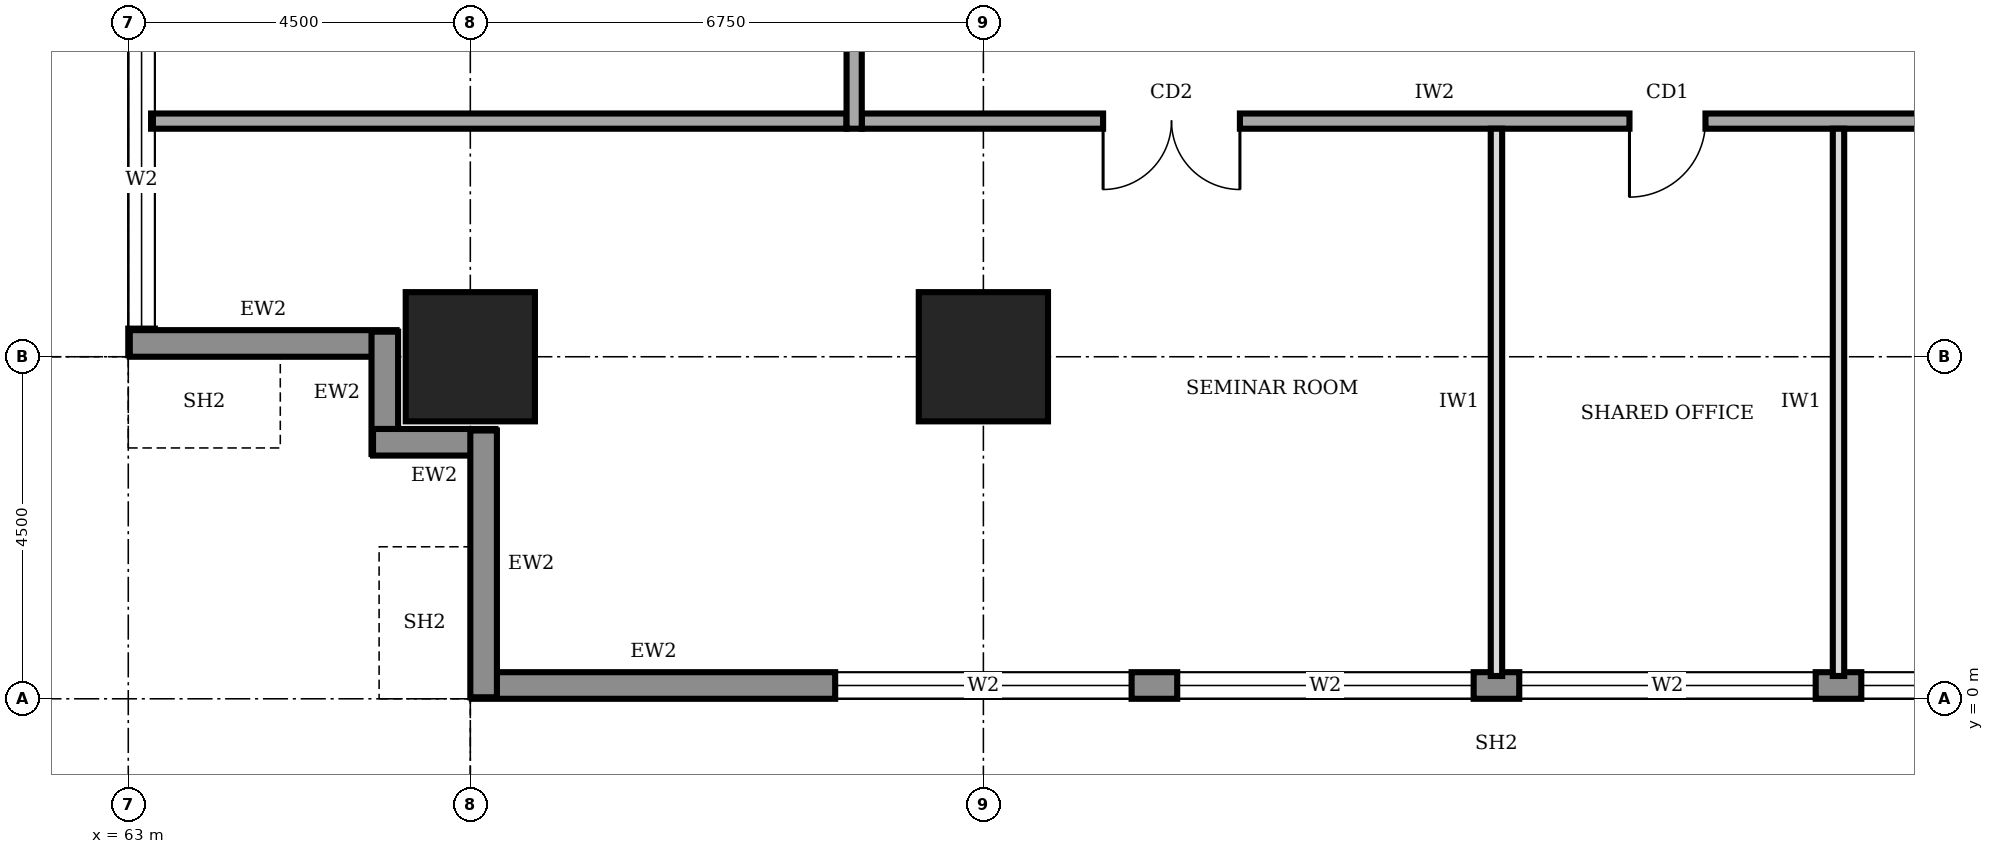
"""IFC4 building model, lengths in metres.
Left out: names, types, materials, properties, quantities, classifications, styles, units other than length and angle.
Written with IfcOpenShell. Run it as: python <this file> out.ifc"""

import sys

from ifc_helpers import new_model, si_unit, direction, frame, frame_2d, origin, origin_2d, place, context, subcontext, project, spatial, rectangle, extrude, element, fill, save


model = new_model("IFC4")
c1 = context("Model", 3, precision=1e-05, world=origin(), true_north=direction((0.0, 1.0)))
c2 = subcontext(c1, "Body", "Model", "MODEL_VIEW")
j1 = project(units=[si_unit("LENGTHUNIT", "METRE"), si_unit("PLANEANGLEUNIT", "RADIAN")], contexts=[c1])
p1 = place(None, origin())
s1 = spatial("IfcSite", under=j1, at=p1, CompositionType="ELEMENT")
p2 = place(p1, origin())
s2 = spatial("IfcBuilding", under=s1, at=p2, CompositionType="ELEMENT")
p3 = place(p2, frame((0.0, 0.0, 61.0)))
s3 = spatial("IfcBuildingStorey", under=s2, at=p3, CompositionType="ELEMENT", Elevation=61.0)
for number, where, z_axis, x_axis in (
    (1, (67.5, 4.5, 0.0), (0.0, 0.0, 1.0), (1.0, 0.0, 0.0)),
    (2, (74.25, 4.5, 0.0), (0.0, 0.0, 1.0), (1.0, 0.0, 0.0)),
):
    element("IfcColumn", number, at=place(p3, frame(where, z_axis=z_axis, x_axis=x_axis)), inside=s3, PredefinedType="COLUMN", context=c2, shape_type="SweptSolid", body=[
        extrude(rectangle(XDim=1.7, YDim=1.7, at=origin_2d()), origin(), (0.0, 0.0, 1.0), 4.0),
    ])
p4 = place(p3, frame((67.52, 0.175, 0.0), z_axis=(0.0, 0.0, 1.0), x_axis=(1.0, 0.0, 0.0)))
e3 = element("IfcWall", 3, at=p4, inside=s3, PredefinedType="STANDARD", context=c2, shape_type="SweptSolid", body=[
    extrude(rectangle(XDim=26.96, YDim=0.35, at=frame_2d((13.48, 0.0))), origin(), (0.0, 0.0, 1.0), 3.75),
])
p5 = place(p4, frame((4.78, 0.0, 0.6)))
e4 = element("IfcOpeningElement", 4, at=p5, cuts=e3, PredefinedType="OPENING", context=c2, shape_type="SweptSolid", body=[
    extrude(rectangle(XDim=3.9, YDim=2.6, at=frame_2d((1.95, 1.3))), frame((0.0, 0.185, 0.0), z_axis=(0.0, -1.0, 0.0), x_axis=(1.0, 0.0, 0.0)), (0.0, 0.0, 1.0), 0.37),
])
p6 = place(p4, frame((9.28, 0.0, 0.6)))
e5 = element("IfcOpeningElement", 5, at=p6, cuts=e3, PredefinedType="OPENING", context=c2, shape_type="SweptSolid", body=[
    extrude(rectangle(XDim=3.9, YDim=2.6, at=frame_2d((1.95, 1.3))), frame((0.0, 0.185, 0.0), z_axis=(0.0, -1.0, 0.0), x_axis=(1.0, 0.0, 0.0)), (0.0, 0.0, 1.0), 0.37),
])
p7 = place(p4, frame((13.78, 0.0, 0.6)))
e6 = element("IfcOpeningElement", 6, at=p7, cuts=e3, PredefinedType="OPENING", context=c2, shape_type="SweptSolid", body=[
    extrude(rectangle(XDim=3.9, YDim=2.6, at=frame_2d((1.95, 1.3))), frame((0.0, 0.185, 0.0), z_axis=(0.0, -1.0, 0.0), x_axis=(1.0, 0.0, 0.0)), (0.0, 0.0, 1.0), 0.37),
])
p8 = place(p4, frame((18.28, 0.0, 0.6)))
e7 = element("IfcOpeningElement", 7, at=p8, cuts=e3, PredefinedType="OPENING", context=c2, shape_type="SweptSolid", body=[
    extrude(rectangle(XDim=3.9, YDim=2.6, at=frame_2d((1.95, 1.3))), frame((0.0, 0.185, 0.0), z_axis=(0.0, -1.0, 0.0), x_axis=(1.0, 0.0, 0.0)), (0.0, 0.0, 1.0), 0.37),
])
p9 = place(p4, frame((22.71, 0.0, 0.6)))
e8 = element("IfcOpeningElement", 8, at=p9, cuts=e3, PredefinedType="OPENING", context=c2, shape_type="SweptSolid", body=[
    extrude(rectangle(XDim=3.9, YDim=2.6, at=frame_2d((1.95, 1.3))), frame((0.0, 0.185, 0.0), z_axis=(0.0, -1.0, 0.0), x_axis=(1.0, 0.0, 0.0)), (0.0, 0.0, 1.0), 0.37),
])
p10 = place(p3, frame((63.175, 35.98, 0.0), z_axis=(0.0, 0.0, 1.0), x_axis=(0.0, -1.0, 0.0)))
e9 = element("IfcWall", 9, at=p10, inside=s3, PredefinedType="STANDARD", context=c2, shape_type="SweptSolid", body=[
    extrude(rectangle(XDim=31.46, YDim=0.35, at=frame_2d((15.73, 0.0))), origin(), (0.0, 0.0, 1.0), 3.75),
])
p11 = place(p10, frame((27.21, 0.0, 0.6)))
e10 = element("IfcOpeningElement", 10, at=p11, cuts=e9, PredefinedType="OPENING", context=c2, shape_type="SweptSolid", body=[
    extrude(rectangle(XDim=3.9, YDim=2.6, at=frame_2d((1.95, 1.3))), frame((0.0, 0.185, 0.0), z_axis=(0.0, -1.0, 0.0), x_axis=(1.0, 0.0, 0.0)), (0.0, 0.0, 1.0), 0.37),
])
p12 = place(p10, frame((22.78, 0.0, 0.6)))
e11 = element("IfcOpeningElement", 11, at=p12, cuts=e9, PredefinedType="OPENING", context=c2, shape_type="SweptSolid", body=[
    extrude(rectangle(XDim=3.9, YDim=2.6, at=frame_2d((1.95, 1.3))), frame((0.0, 0.185, 0.0), z_axis=(0.0, -1.0, 0.0), x_axis=(1.0, 0.0, 0.0)), (0.0, 0.0, 1.0), 0.37),
])
p13 = place(p10, frame((18.28, 0.0, 0.6)))
e12 = element("IfcOpeningElement", 12, at=p13, cuts=e9, PredefinedType="OPENING", context=c2, shape_type="SweptSolid", body=[
    extrude(rectangle(XDim=3.9, YDim=2.6, at=frame_2d((1.95, 1.3))), frame((0.0, 0.185, 0.0), z_axis=(0.0, -1.0, 0.0), x_axis=(1.0, 0.0, 0.0)), (0.0, 0.0, 1.0), 0.37),
])
p14 = place(p10, frame((13.78, 0.0, 0.6)))
e13 = element("IfcOpeningElement", 13, at=p14, cuts=e9, PredefinedType="OPENING", context=c2, shape_type="SweptSolid", body=[
    extrude(rectangle(XDim=3.9, YDim=2.6, at=frame_2d((1.95, 1.3))), frame((0.0, 0.185, 0.0), z_axis=(0.0, -1.0, 0.0), x_axis=(1.0, 0.0, 0.0)), (0.0, 0.0, 1.0), 0.37),
])
p15 = place(p10, frame((9.28, 0.0, 0.6)))
e14 = element("IfcOpeningElement", 14, at=p15, cuts=e9, PredefinedType="OPENING", context=c2, shape_type="SweptSolid", body=[
    extrude(rectangle(XDim=3.9, YDim=2.6, at=frame_2d((1.95, 1.3))), frame((0.0, 0.185, 0.0), z_axis=(0.0, -1.0, 0.0), x_axis=(1.0, 0.0, 0.0)), (0.0, 0.0, 1.0), 0.37),
])
p16 = place(p10, frame((4.78, 0.0, 0.6)))
e15 = element("IfcOpeningElement", 15, at=p16, cuts=e9, PredefinedType="OPENING", context=c2, shape_type="SweptSolid", body=[
    extrude(rectangle(XDim=3.9, YDim=2.6, at=frame_2d((1.95, 1.3))), frame((0.0, 0.185, 0.0), z_axis=(0.0, -1.0, 0.0), x_axis=(1.0, 0.0, 0.0)), (0.0, 0.0, 1.0), 0.37),
])
p17 = place(p3, frame((63.02, 4.675, 0.0), z_axis=(0.0, 0.0, 1.0), x_axis=(1.0, 0.0, 0.0)))
e16 = element("IfcWall", 16, at=p17, inside=s3, PredefinedType="STANDARD", context=c2, shape_type="SweptSolid", body=[
    extrude(rectangle(XDim=3.51, YDim=0.35, at=frame_2d((1.755, 0.0))), origin(), (0.0, 0.0, 1.0), 2.85),
])
for number, where, z_axis, x_axis in (
    (17, (66.375, 4.83, 0.0), (0.0, 0.0, 1.0), (0.0, -1.0, 0.0)),
    (18, (66.22, 3.375, 0.0), (0.0, 0.0, 1.0), (1.0, 0.0, 0.0)),
):
    element("IfcWall", number, at=place(p3, frame(where, z_axis=z_axis, x_axis=x_axis)), inside=s3, PredefinedType="STANDARD", context=c2, shape_type="SweptSolid", body=[
        extrude(rectangle(XDim=1.61, YDim=0.35, at=frame_2d((0.805, 0.0))), origin(), (0.0, 0.0, 1.0), 3.75),
    ])
p18 = place(p3, frame((67.675, 3.53, 0.0), z_axis=(0.0, 0.0, 1.0), x_axis=(0.0, -1.0, 0.0)))
e19 = element("IfcWall", 19, at=p18, inside=s3, PredefinedType="STANDARD", context=c2, shape_type="SweptSolid", body=[
    extrude(rectangle(XDim=3.51, YDim=0.35, at=frame_2d((1.755, 0.0))), origin(), (0.0, 0.0, 1.0), 2.85),
])
p19 = place(p3, frame((72.65, 7.6, 0.0), z_axis=(0.0, 0.0, 1.0), x_axis=(1.0, 0.0, 0.0)))
e20 = element("IfcWall", 20, at=p19, inside=s3, PredefinedType="SOLIDWALL", context=c2, shape_type="SweptSolid", body=[
    extrude(rectangle(XDim=16.9, YDim=0.2, at=frame_2d((8.45, 0.0))), origin(), (0.0, 0.0, 1.0), 3.75),
])
p20 = place(p19, frame((3.175, 0.0, 0.0)))
e21 = element("IfcOpeningElement", 21, at=p20, cuts=e20, PredefinedType="OPENING", context=c2, shape_type="SweptSolid", body=[
    extrude(rectangle(XDim=1.8, YDim=2.1, at=frame_2d((0.9, 1.05))), frame((0.0, 0.11, 0.0), z_axis=(0.0, -1.0, 0.0), x_axis=(1.0, 0.0, 0.0)), (0.0, 0.0, 1.0), 0.22),
])
p21 = place(p19, frame((10.1, 0.0, 0.0)))
e22 = element("IfcOpeningElement", 22, at=p21, cuts=e20, PredefinedType="OPENING", context=c2, shape_type="SweptSolid", body=[
    extrude(rectangle(XDim=1.0, YDim=2.1, at=frame_2d((0.5, 1.05))), frame((0.0, 0.11, 0.0), z_axis=(0.0, -1.0, 0.0), x_axis=(1.0, 0.0, 0.0)), (0.0, 0.0, 1.0), 0.22),
])
p22 = place(p19, frame((14.375, 0.0, 0.0)))
e23 = element("IfcOpeningElement", 23, at=p22, cuts=e20, PredefinedType="OPENING", context=c2, shape_type="SweptSolid", body=[
    extrude(rectangle(XDim=1.0, YDim=2.1, at=frame_2d((0.5, 1.05))), frame((0.0, 0.11, 0.0), z_axis=(0.0, -1.0, 0.0), x_axis=(1.0, 0.0, 0.0)), (0.0, 0.0, 1.0), 0.22),
])
p23 = place(p3, frame((72.55, 32.8, 0.0), z_axis=(0.0, 0.0, 1.0), x_axis=(0.0, -1.0, 0.0)))
e24 = element("IfcWall", 24, at=p23, inside=s3, PredefinedType="SOLIDWALL", context=c2, shape_type="SweptSolid", body=[
    extrude(rectangle(XDim=25.3, YDim=0.2, at=frame_2d((12.65, 0.0))), origin(), (0.0, 0.0, 1.0), 3.75),
])
p24 = place(p23, frame((19.55, 0.0, 0.0)))
e25 = element("IfcOpeningElement", 25, at=p24, cuts=e24, PredefinedType="OPENING", context=c2, shape_type="SweptSolid", body=[
    extrude(rectangle(XDim=1.0, YDim=2.1, at=frame_2d((0.5, 1.05))), frame((0.0, 0.11, 0.0), z_axis=(0.0, -1.0, 0.0), x_axis=(1.0, 0.0, 0.0)), (0.0, 0.0, 1.0), 0.22),
])
p25 = place(p23, frame((6.4, 0.0, 0.0)))
e26 = element("IfcOpeningElement", 26, at=p25, cuts=e24, PredefinedType="OPENING", context=c2, shape_type="SweptSolid", body=[
    extrude(rectangle(XDim=1.8, YDim=2.1, at=frame_2d((0.9, 1.05))), frame((0.0, 0.11, 0.0), z_axis=(0.0, -1.0, 0.0), x_axis=(1.0, 0.0, 0.0)), (0.0, 0.0, 1.0), 0.22),
])
p26 = place(p3, frame((63.3, 7.6, 0.0), z_axis=(0.0, 0.0, 1.0), x_axis=(1.0, 0.0, 0.0)))
e27 = element("IfcWall", 27, at=p26, inside=s3, PredefinedType="SOLIDWALL", context=c2, shape_type="SweptSolid", body=[
    extrude(rectangle(XDim=9.15, YDim=0.2, at=frame_2d((4.575, 0.0))), origin(), (0.0, 0.0, 1.0), 3.75),
])
for number, where, z_axis, x_axis in (
    (28, (81.0, 0.3, 0.0), (0.0, 0.0, 1.0), (0.0, 1.0, 0.0)),
    (29, (85.5, 0.3, 0.0), (0.0, 0.0, 1.0), (0.0, 1.0, 0.0)),
):
    element("IfcWall", number, at=place(p3, frame(where, z_axis=z_axis, x_axis=x_axis)), inside=s3, PredefinedType="PARTITIONING", context=c2, shape_type="SweptSolid", body=[
        extrude(rectangle(XDim=7.2, YDim=0.15, at=frame_2d((3.6, 0.0))), origin(), (0.0, 0.0, 1.0), 3.75),
    ])
p27 = place(p5, origin())
e30 = element("IfcWindow", 30, at=p27, inside=s3, PartitioningType="SINGLE_PANEL", PredefinedType="WINDOW", context=c2, shape_type="SweptSolid", body=[
    extrude(rectangle(XDim=3.9, YDim=2.6, at=frame_2d((1.95, 1.3))), frame((0.0, 0.03, 0.0), z_axis=(0.0, -1.0, 0.0), x_axis=(1.0, 0.0, 0.0)), (0.0, 0.0, 1.0), 0.06),
])
fill(e4, e30)
p28 = place(p6, origin())
e31 = element("IfcWindow", 31, at=p28, inside=s3, PartitioningType="SINGLE_PANEL", PredefinedType="WINDOW", context=c2, shape_type="SweptSolid", body=[
    extrude(rectangle(XDim=3.9, YDim=2.6, at=frame_2d((1.95, 1.3))), frame((0.0, 0.03, 0.0), z_axis=(0.0, -1.0, 0.0), x_axis=(1.0, 0.0, 0.0)), (0.0, 0.0, 1.0), 0.06),
])
fill(e5, e31)
p29 = place(p7, origin())
e32 = element("IfcWindow", 32, at=p29, inside=s3, PartitioningType="SINGLE_PANEL", PredefinedType="WINDOW", context=c2, shape_type="SweptSolid", body=[
    extrude(rectangle(XDim=3.9, YDim=2.6, at=frame_2d((1.95, 1.3))), frame((0.0, 0.03, 0.0), z_axis=(0.0, -1.0, 0.0), x_axis=(1.0, 0.0, 0.0)), (0.0, 0.0, 1.0), 0.06),
])
fill(e6, e32)
p30 = place(p8, origin())
e33 = element("IfcWindow", 33, at=p30, inside=s3, PartitioningType="SINGLE_PANEL", PredefinedType="WINDOW", context=c2, shape_type="SweptSolid", body=[
    extrude(rectangle(XDim=3.9, YDim=2.6, at=frame_2d((1.95, 1.3))), frame((0.0, 0.03, 0.0), z_axis=(0.0, -1.0, 0.0), x_axis=(1.0, 0.0, 0.0)), (0.0, 0.0, 1.0), 0.06),
])
fill(e7, e33)
p31 = place(p11, origin())
e34 = element("IfcWindow", 34, at=p31, inside=s3, PartitioningType="SINGLE_PANEL", PredefinedType="WINDOW", context=c2, shape_type="SweptSolid", body=[
    extrude(rectangle(XDim=3.9, YDim=2.6, at=frame_2d((1.95, 1.3))), frame((0.0, 0.03, 0.0), z_axis=(0.0, -1.0, 0.0), x_axis=(1.0, 0.0, 0.0)), (0.0, 0.0, 1.0), 0.06),
])
fill(e10, e34)
p32 = place(p20, frame((1.8, 0.0, 0.0), z_axis=(0.0, 0.0, 1.0), x_axis=(-1.0, 0.0, 0.0)))
e35 = element("IfcDoor", 35, at=p32, inside=s3, OperationType="DOUBLE_DOOR_SINGLE_SWING", PredefinedType="DOOR", context=c2, shape_type="SweptSolid", body=[
    extrude(rectangle(XDim=1.8, YDim=2.1, at=frame_2d((0.9, 1.05))), frame((0.0, 0.025, 0.0), z_axis=(0.0, -1.0, 0.0), x_axis=(1.0, 0.0, 0.0)), (0.0, 0.0, 1.0), 0.05),
])
fill(e21, e35)
p33 = place(p21, frame((1.0, 0.0, 0.0), z_axis=(0.0, 0.0, 1.0), x_axis=(-1.0, 0.0, 0.0)))
e36 = element("IfcDoor", 36, at=p33, inside=s3, OperationType="SINGLE_SWING_RIGHT", PredefinedType="DOOR", context=c2, shape_type="SweptSolid", body=[
    extrude(rectangle(XDim=1.0, YDim=2.1, at=frame_2d((0.5, 1.05))), frame((0.0, 0.025, 0.0), z_axis=(0.0, -1.0, 0.0), x_axis=(1.0, 0.0, 0.0)), (0.0, 0.0, 1.0), 0.05),
])
fill(e22, e36)
save(model, sys.argv[1])
